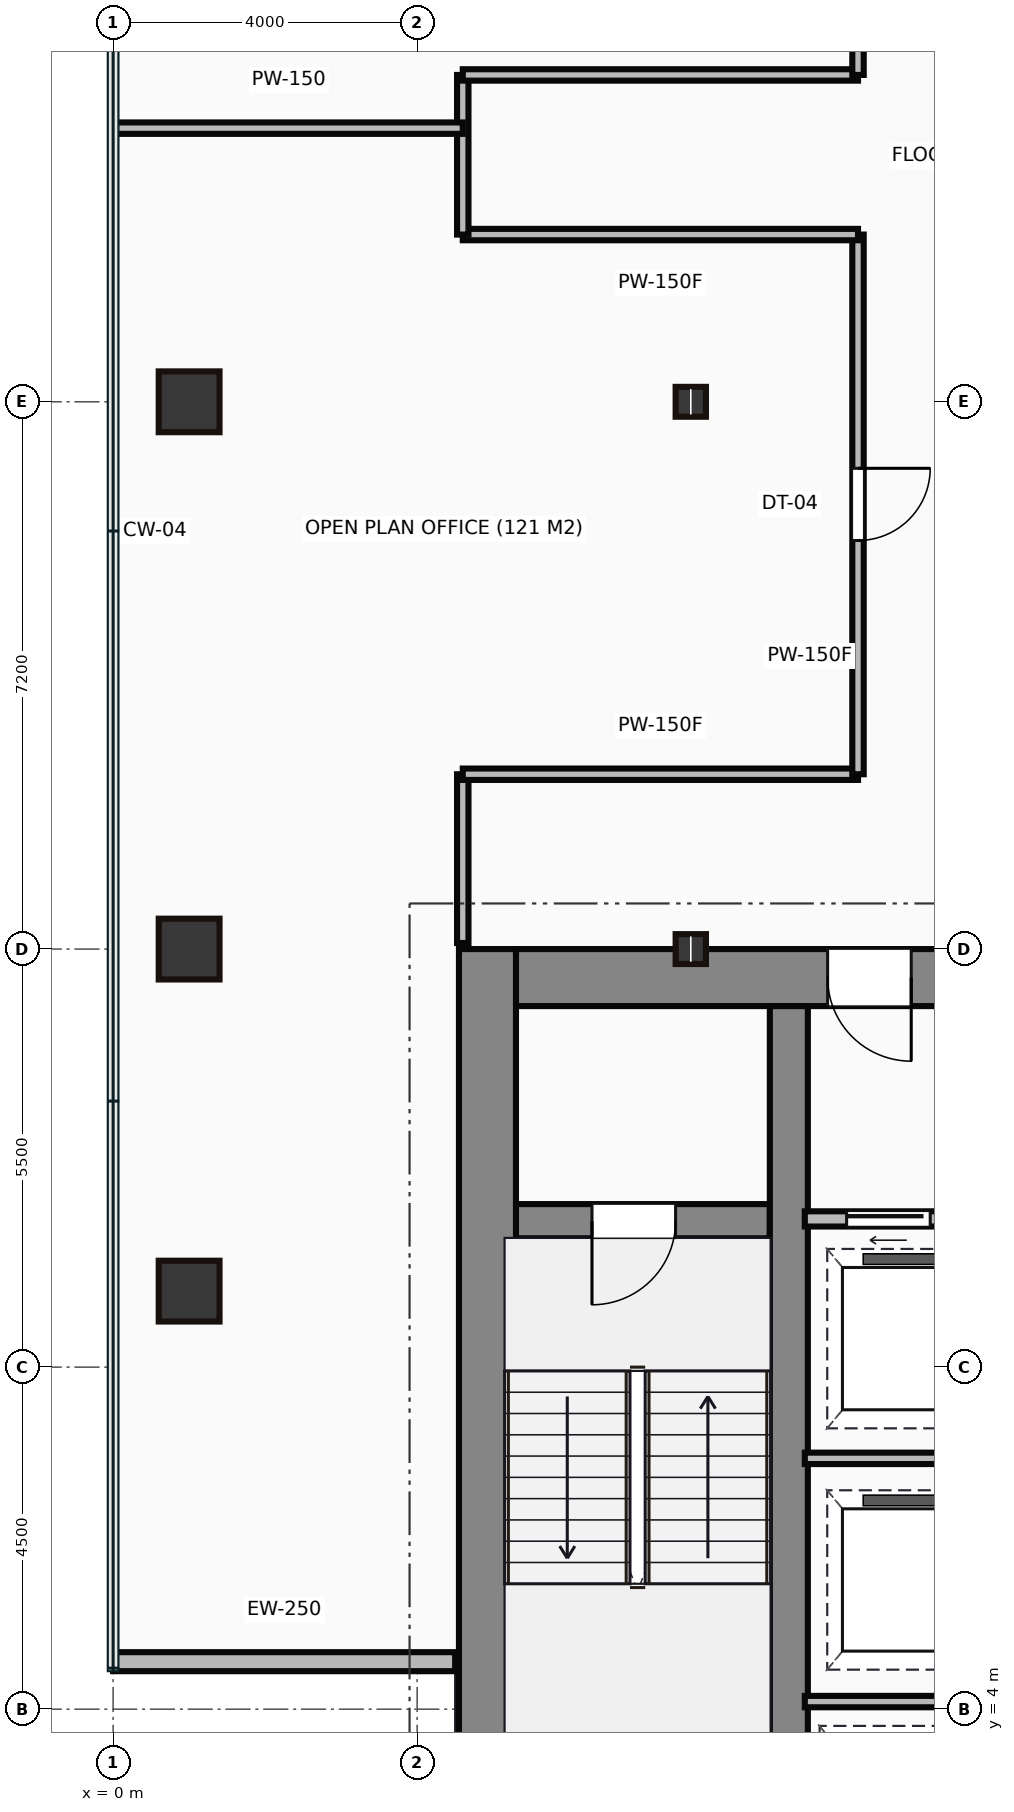
"""IFC4 building model, lengths in metres.
Left out: names, types, materials, properties, quantities, classifications, styles, units other than length and angle.
Written with IfcOpenShell. Run it as: python <this file> out.ifc"""

import sys

from ifc_helpers import new_model, si_unit, direction, frame, frame_2d, origin, origin_2d, place, context, subcontext, project, spatial, rectangle, hollow_rectangle, i_section, extrude, source, transform, mapped, element, fill, save


model = new_model("IFC4")
c1 = context("Model", 3, precision=1e-05, world=origin(), true_north=direction((0.0, 1.0)))
c2 = subcontext(c1, "Body", "Model", "MODEL_VIEW")
j1 = project(units=[si_unit("LENGTHUNIT", "METRE"), si_unit("PLANEANGLEUNIT", "RADIAN")], contexts=[c1])
p1 = place(None, origin())
s1 = spatial("IfcSite", under=j1, at=p1, CompositionType="ELEMENT")
p2 = place(p1, origin())
s2 = spatial("IfcBuilding", under=s1, at=p2, CompositionType="ELEMENT")
p3 = place(p2, frame((0.0, 0.0, 125.15)))
s3 = spatial("IfcBuildingStorey", under=s2, at=p3, CompositionType="ELEMENT", Elevation=125.15)
m1 = source(origin(), c2, "Body", "SweptSolid", [
    extrude(rectangle(XDim=13.1, YDim=0.75, at=frame_2d((6.55, 0.0))), origin(), (0.0, 0.0, 1.0), 3.65),
])
p4 = place(p3, frame((4.925, 0.9, 0.0), z_axis=(0.0, 0.0, 1.0), x_axis=(0.0, 1.0, 0.0)))
e1 = element("IfcWall", 1, at=p4, inside=s3, PredefinedType="SHEAR", context=c2, shape_type="MappedRepresentation", body=[
    mapped(m1, transform((0.0, 0.0, 0.0))),
])
m2 = source(origin(), c2, "Body", "SweptSolid", [
    extrude(rectangle(XDim=9.1, YDim=0.75, at=frame_2d((4.55, 0.0))), origin(), (0.0, 0.0, 1.0), 3.65),
])
p5 = place(p3, frame((5.3, 13.625, 0.0), z_axis=(0.0, 0.0, 1.0), x_axis=(1.0, 0.0, 0.0)))
e2 = element("IfcWall", 2, at=p5, inside=s3, PredefinedType="SHEAR", context=c2, shape_type="MappedRepresentation", body=[
    mapped(m2, transform((0.0, 0.0, 0.0))),
])
p6 = place(p5, frame((4.1, 0.0, 0.0)))
e3 = element("IfcOpeningElement", 3, at=p6, cuts=e2, PredefinedType="OPENING", context=c2, shape_type="SweptSolid", body=[
    extrude(rectangle(XDim=1.1, YDim=2.15, at=frame_2d((0.55, 1.075))), frame((0.0, 0.385, 0.0), z_axis=(0.0, -1.0, 0.0), x_axis=(1.0, 0.0, 0.0)), (0.0, 0.0, 1.0), 0.77),
])
m3 = source(origin(), c2, "Body", "SweptSolid", [
    extrude(rectangle(XDim=12.35, YDim=0.5, at=frame_2d((6.175, 0.0))), origin(), (0.0, 0.0, 1.0), 3.65),
])
p7 = place(p3, frame((8.89, 0.9, 0.0), z_axis=(0.0, 0.0, 1.0), x_axis=(0.0, 1.0, 0.0)))
e4 = element("IfcWall", 4, at=p7, inside=s3, PredefinedType="SHEAR", context=c2, shape_type="MappedRepresentation", body=[
    mapped(m3, transform((0.0, 0.0, 0.0))),
])
m4 = source(origin(), c2, "Body", "SweptSolid", [
    extrude(rectangle(XDim=3.39, YDim=0.45, at=frame_2d((1.695, 0.0))), origin(), (0.0, 0.0, 1.0), 3.65),
])
p8 = place(p3, frame((5.25, 10.42, 0.0), z_axis=(0.0, 0.0, 1.0), x_axis=(1.0, 0.0, 0.0)))
e5 = element("IfcWall", 5, at=p8, inside=s3, PredefinedType="SHEAR", context=c2, shape_type="MappedRepresentation", body=[
    mapped(m4, transform((0.0, 0.0, 0.0))),
])
p9 = place(p8, frame((1.05, 0.0, 0.0)))
e6 = element("IfcOpeningElement", 6, at=p9, cuts=e5, PredefinedType="OPENING", context=c2, shape_type="SweptSolid", body=[
    extrude(rectangle(XDim=1.1, YDim=2.15, at=frame_2d((0.55, 1.075))), frame((0.0, 0.235, 0.0), z_axis=(0.0, -1.0, 0.0), x_axis=(1.0, 0.0, 0.0)), (0.0, 0.0, 1.0), 0.47),
])
m5 = source(origin(), c2, "Body", "SweptSolid", [
    extrude(hollow_rectangle(XDim=0.8, YDim=0.8, WallThickness=0.04, at=origin_2d()), origin(), (0.0, 0.0, 1.0), 3.65),
])
for number, where, z_axis, x_axis in (
    (7, (1.0, 9.5, 0.0), (0.0, 0.0, 1.0), (1.0, 0.0, 0.0)),
    (8, (1.0, 14.0, 0.0), (0.0, 0.0, 1.0), (1.0, 0.0, 0.0)),
    (9, (1.0, 21.2, 0.0), (0.0, 0.0, 1.0), (1.0, 0.0, 0.0)),
):
    element("IfcColumn", number, at=place(p3, frame(where, z_axis=z_axis, x_axis=x_axis)), inside=s3, PredefinedType="COLUMN", context=c2, shape_type="MappedRepresentation", body=[
        mapped(m5, transform((0.0, 0.0, 0.0))),
    ])
m6 = source(origin(), c2, "Body", "SweptSolid", [
    extrude(i_section(OverallWidth=0.399, OverallDepth=0.393, WebThickness=0.023, FlangeThickness=0.037, at=origin_2d()), origin(), (0.0, 0.0, 1.0), 3.65),
])
for number, where, z_axis, x_axis in (
    (10, (7.6, 14.0, 0.0), (0.0, 0.0, 1.0), (1.0, 0.0, 0.0)),
    (11, (7.6, 21.2, 0.0), (0.0, 0.0, 1.0), (1.0, 0.0, 0.0)),
):
    element("IfcColumn", number, at=place(p3, frame(where, z_axis=z_axis, x_axis=x_axis)), inside=s3, PredefinedType="COLUMN", context=c2, shape_type="MappedRepresentation", body=[
        mapped(m6, transform((0.0, 0.0, 0.0))),
    ])
m7 = source(origin(), c2, "Body", "SweptSolid", [
    extrude(rectangle(XDim=4.5, YDim=0.25, at=frame_2d((2.25, 0.0))), origin(), (0.0, 0.0, 1.0), 3.4),
])
p10 = place(p3, frame((0.0, 4.625, 0.0), z_axis=(0.0, 0.0, 1.0), x_axis=(1.0, 0.0, 0.0)))
e12 = element("IfcWall", 12, at=p10, inside=s3, PredefinedType="STANDARD", context=c2, shape_type="MappedRepresentation", body=[
    mapped(m7, transform((0.0, 0.0, 0.0))),
])
m8 = source(origin(), c2, "Body", "SweptSolid", [
    extrude(rectangle(XDim=2.35, YDim=0.2, at=frame_2d((1.175, 0.0))), origin(), (0.0, 0.0, 1.0), 3.4),
])
p11 = place(p3, frame((9.1, 10.45, 0.0), z_axis=(0.0, 0.0, 1.0), x_axis=(1.0, 0.0, 0.0)))
e13 = element("IfcWall", 13, at=p11, inside=s3, PredefinedType="PARTITIONING", context=c2, shape_type="MappedRepresentation", body=[
    mapped(m8, transform((0.0, 0.0, 0.0))),
])
p12 = place(p11, frame((0.55, 0.0, 0.0)))
e14 = element("IfcOpeningElement", 14, at=p12, cuts=e13, PredefinedType="OPENING", context=c2, shape_type="SweptSolid", body=[
    extrude(rectangle(XDim=1.1, YDim=2.15, at=frame_2d((0.55, 1.075))), frame((0.0, 0.11, 0.0), z_axis=(0.0, -1.0, 0.0), x_axis=(1.0, 0.0, 0.0)), (0.0, 0.0, 1.0), 0.22),
])
m9 = source(origin(), c2, "Body", "SweptSolid", [
    extrude(rectangle(XDim=2.4, YDim=0.15, at=frame_2d((1.2, 0.0))), origin(), (0.0, 0.0, 1.0), 3.4),
])
for number, where, z_axis, x_axis in (
    (15, (9.1, 4.1, 0.0), (0.0, 0.0, 1.0), (1.0, 0.0, 0.0)),
    (16, (9.1, 7.3, 0.0), (0.0, 0.0, 1.0), (1.0, 0.0, 0.0)),
):
    element("IfcWall", number, at=place(p3, frame(where, z_axis=z_axis, x_axis=x_axis)), inside=s3, PredefinedType="PARTITIONING", context=c2, shape_type="MappedRepresentation", body=[
        mapped(m9, transform((0.0, 0.0, 0.0))),
    ])
m10 = source(origin(), c2, "Body", "SweptSolid", [
    extrude(rectangle(XDim=2.22, YDim=0.15, at=frame_2d((1.11, 0.0))), origin(), (0.0, 0.0, 1.0), 3.4),
])
p13 = place(p3, frame((4.6, 14.08, 0.0), z_axis=(0.0, 0.0, 1.0), x_axis=(0.0, 1.0, 0.0)))
e17 = element("IfcWall", 17, at=p13, inside=s3, PredefinedType="PARTITIONING", context=c2, shape_type="MappedRepresentation", body=[
    mapped(m10, transform((0.0, 0.0, 0.0))),
])
m11 = source(origin(), c2, "Body", "SweptSolid", [
    extrude(rectangle(XDim=5.2, YDim=0.15, at=frame_2d((2.6, 0.0))), origin(), (0.0, 0.0, 1.0), 3.4),
])
p14 = place(p3, frame((4.6, 16.3, 0.0), z_axis=(0.0, 0.0, 1.0), x_axis=(1.0, 0.0, 0.0)))
e18 = element("IfcWall", 18, at=p14, inside=s3, PredefinedType="PARTITIONING", context=c2, shape_type="MappedRepresentation", body=[
    mapped(m11, transform((0.0, 0.0, 0.0))),
])
m12 = source(origin(), c2, "Body", "SweptSolid", [
    extrude(rectangle(XDim=7.1, YDim=0.15, at=frame_2d((3.55, 0.0))), origin(), (0.0, 0.0, 1.0), 3.4),
])
p15 = place(p3, frame((9.8, 16.3, 0.0), z_axis=(0.0, 0.0, 1.0), x_axis=(0.0, 1.0, 0.0)))
e19 = element("IfcWall", 19, at=p15, inside=s3, PredefinedType="PARTITIONING", context=c2, shape_type="MappedRepresentation", body=[
    mapped(m12, transform((0.0, 0.0, 0.0))),
])
p16 = place(p15, frame((3.075, 0.0, 0.0)))
e20 = element("IfcOpeningElement", 20, at=p16, cuts=e19, PredefinedType="OPENING", context=c2, shape_type="SweptSolid", body=[
    extrude(rectangle(XDim=0.95, YDim=2.15, at=frame_2d((0.475, 1.075))), frame((0.0, 0.085, 0.0), z_axis=(0.0, -1.0, 0.0), x_axis=(1.0, 0.0, 0.0)), (0.0, 0.0, 1.0), 0.17),
])
m13 = source(origin(), c2, "Body", "SweptSolid", [
    extrude(rectangle(XDim=5.2, YDim=0.15, at=frame_2d((2.6, 0.0))), origin(), (0.0, 0.0, 1.0), 2.988),
])
p17 = place(p3, frame((9.8, 23.4, 0.0), z_axis=(0.0, 0.0, 1.0), x_axis=(-1.0, 0.0, 0.0)))
e21 = element("IfcWall", 21, at=p17, inside=s3, PredefinedType="PARTITIONING", context=c2, shape_type="MappedRepresentation", body=[
    mapped(m13, transform((0.0, 0.0, 0.0))),
])
m14 = source(origin(), c2, "Body", "SweptSolid", [
    extrude(rectangle(XDim=2.1, YDim=0.15, at=frame_2d((1.05, 0.0))), origin(), (0.0, 0.0, 1.0), 3.4),
])
p18 = place(p3, frame((4.6, 23.4, 0.0), z_axis=(0.0, 0.0, 1.0), x_axis=(0.0, 1.0, 0.0)))
e22 = element("IfcWall", 22, at=p18, inside=s3, PredefinedType="PARTITIONING", context=c2, shape_type="MappedRepresentation", body=[
    mapped(m14, transform((0.0, 0.0, 0.0))),
])
p19 = place(p3, frame((4.6, 25.5, 0.0), z_axis=(0.0, 0.0, 1.0), x_axis=(1.0, 0.0, 0.0)))
e23 = element("IfcWall", 23, at=p19, inside=s3, PredefinedType="PARTITIONING", context=c2, shape_type="MappedRepresentation", body=[
    mapped(m13, transform((0.0, 0.0, 0.0))),
])
m15 = source(origin(), c2, "Body", "SweptSolid", [
    extrude(rectangle(XDim=9.0, YDim=0.15, at=frame_2d((4.5, 0.0))), origin(), (0.0, 0.0, 1.0), 3.4),
])
p20 = place(p3, frame((9.8, 25.5, 0.0), z_axis=(0.0, 0.0, 1.0), x_axis=(0.0, 1.0, 0.0)))
e24 = element("IfcWall", 24, at=p20, inside=s3, PredefinedType="PARTITIONING", context=c2, shape_type="MappedRepresentation", body=[
    mapped(m15, transform((0.0, 0.0, 0.0))),
])
p21 = place(p20, frame((3.805, 0.0, 0.0)))
e25 = element("IfcOpeningElement", 25, at=p21, cuts=e24, PredefinedType="OPENING", context=c2, shape_type="SweptSolid", body=[
    extrude(rectangle(XDim=0.95, YDim=2.15, at=frame_2d((0.475, 1.075))), frame((0.0, 0.085, 0.0), z_axis=(0.0, -1.0, 0.0), x_axis=(1.0, 0.0, 0.0)), (0.0, 0.0, 1.0), 0.17),
])
m16 = source(origin(), c2, "Body", "SweptSolid", [
    extrude(rectangle(XDim=4.58, YDim=0.15, at=frame_2d((2.29, 0.0))), origin(), (0.0, 0.0, 1.0), 3.4),
])
p22 = place(p3, frame((0.02, 24.8, 0.0), z_axis=(0.0, 0.0, 1.0), x_axis=(1.0, 0.0, 0.0)))
e26 = element("IfcWall", 26, at=p22, inside=s3, PredefinedType="PARTITIONING", context=c2, shape_type="MappedRepresentation", body=[
    mapped(m16, transform((0.0, 0.0, 0.0))),
])
m17 = source(origin(), c2, "Body", "SweptSolid", [
    extrude(rectangle(XDim=1.1, YDim=2.15, at=frame_2d((0.55, 1.075))), frame((0.0, 0.025, 0.0), z_axis=(0.0, -1.0, 0.0), x_axis=(1.0, 0.0, 0.0)), (0.0, 0.0, 1.0), 0.05),
])
p23 = place(p9, frame((1.1, 0.0, 0.0), z_axis=(0.0, 0.0, 1.0), x_axis=(-1.0, 0.0, 0.0)))
e27 = element("IfcDoor", 27, at=p23, inside=s3, OperationType="SINGLE_SWING_LEFT", PredefinedType="DOOR", context=c2, shape_type="MappedRepresentation", body=[
    mapped(m17, transform((0.0, 0.0, 0.0))),
])
fill(e6, e27)
p24 = place(p6, origin())
e28 = element("IfcDoor", 28, at=p24, inside=s3, OperationType="SINGLE_SWING_RIGHT", PredefinedType="DOOR", context=c2, shape_type="MappedRepresentation", body=[
    mapped(m17, transform((0.0, 0.0, 0.0))),
])
fill(e3, e28)
p25 = place(p12, origin())
e29 = element("IfcDoor", 29, at=p25, inside=s3, OperationType="SLIDING_TO_LEFT", PredefinedType="DOOR", context=c2, shape_type="MappedRepresentation", body=[
    mapped(m17, transform((0.0, 0.0, 0.0))),
])
fill(e14, e29)
m18 = source(origin(), c2, "Body", "SweptSolid", [
    extrude(rectangle(XDim=0.95, YDim=2.15, at=frame_2d((0.475, 1.075))), frame((0.0, 0.025, 0.0), z_axis=(0.0, -1.0, 0.0), x_axis=(1.0, 0.0, 0.0)), (0.0, 0.0, 1.0), 0.05),
])
p26 = place(p16, origin())
e30 = element("IfcDoor", 30, at=p26, inside=s3, OperationType="SINGLE_SWING_RIGHT", PredefinedType="DOOR", context=c2, shape_type="MappedRepresentation", body=[
    mapped(m18, transform((0.0, 0.0, 0.0))),
])
fill(e20, e30)
save(model, sys.argv[1])
